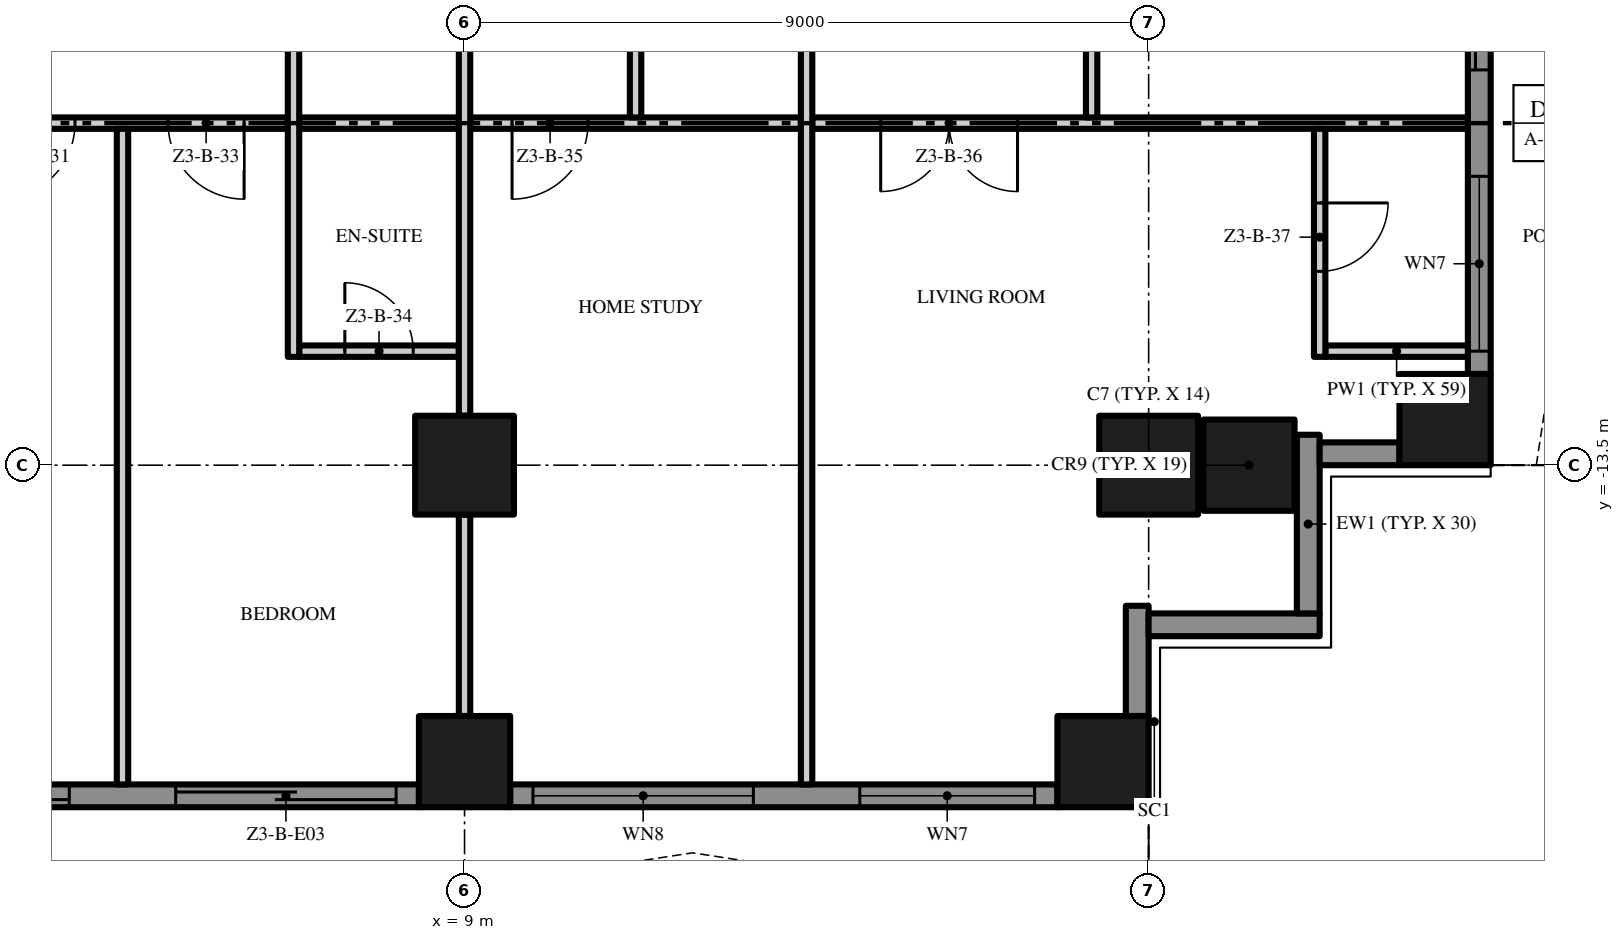
"""IFC4 building model, lengths in metres.
Left out: names, types, materials, properties, quantities, classifications, styles, units other than length and angle.
Written with IfcOpenShell. Run it as: python <this file> out.ifc"""

import sys

from ifc_helpers import new_model, si_unit, direction, frame, frame_2d, origin, origin_2d, place, context, subcontext, project, spatial, polyline, rectangle, outline, extrude, element, fill, save


model = new_model("IFC4")
c1 = context("Model", 3, precision=1e-05, world=origin(), true_north=direction((0.0, 1.0)))
c2 = subcontext(c1, "Body", "Model", "MODEL_VIEW")
j1 = project(units=[si_unit("LENGTHUNIT", "METRE"), si_unit("PLANEANGLEUNIT", "RADIAN")], contexts=[c1])
p1 = place(None, origin())
s1 = spatial("IfcSite", under=j1, at=p1, CompositionType="ELEMENT")
p2 = place(p1, origin())
s2 = spatial("IfcBuilding", under=s1, at=p2, CompositionType="ELEMENT")
p3 = place(p2, frame((0.0, 0.0, 136.4)))
s3 = spatial("IfcBuildingStorey", under=s2, at=p3, CompositionType="ELEMENT", Elevation=136.4)
p4 = place(p3, frame((18.0, -13.5, 0.0), z_axis=(0.0, 0.0, 1.0), x_axis=(1.0, 0.0, 0.0)))
e1 = element("IfcColumn", 1, at=p4, inside=s3, PredefinedType="COLUMN", context=c2, shape_type="SweptSolid", body=[
    extrude(rectangle(XDim=1.3, YDim=1.3, at=origin_2d()), origin(), (0.0, 0.0, 1.0), 3.5),
])
for number, where, z_axis, x_axis in (
    (2, (17.4, -17.4, 0.0), (0.0, 0.0, 1.0), (1.0, 0.0, 0.0)),
    (3, (21.9, -12.9, 0.0), (0.0, 0.0, 1.0), (1.0, 0.0, 0.0)),
    (4, (19.32, -13.5, 0.0), (0.0, 0.0, 1.0), (1.0, 0.0, 0.0)),
):
    element("IfcColumn", number, at=place(p3, frame(where, z_axis=z_axis, x_axis=x_axis)), inside=s3, PredefinedType="COLUMN", context=c2, shape_type="SweptSolid", body=[
        extrude(rectangle(XDim=1.2, YDim=1.2, at=origin_2d()), origin(), (0.0, 0.0, 1.0), 3.5),
    ])
p5 = place(p3, frame((9.0, -13.5, 0.0), z_axis=(0.0, 0.0, 1.0), x_axis=(1.0, 0.0, 0.0)))
e5 = element("IfcColumn", 5, at=p5, inside=s3, PredefinedType="COLUMN", context=c2, shape_type="SweptSolid", body=[
    extrude(rectangle(XDim=1.3, YDim=1.3, at=origin_2d()), origin(), (0.0, 0.0, 1.0), 3.5),
])
p6 = place(p3, frame((9.0, -17.4, 0.0), z_axis=(0.0, 0.0, 1.0), x_axis=(1.0, 0.0, 0.0)))
e6 = element("IfcColumn", 6, at=p6, inside=s3, PredefinedType="COLUMN", context=c2, shape_type="SweptSolid", body=[
    extrude(rectangle(XDim=1.2, YDim=1.2, at=origin_2d()), origin(), (0.0, 0.0, 1.0), 3.5),
])
p7 = place(p3, frame((8.4, -17.85, 0.0), z_axis=(0.0, 0.0, 1.0), x_axis=(-1.0, 0.0, 0.0)))
e7 = element("IfcWall", 7, at=p7, inside=s3, PredefinedType="SOLIDWALL", context=c2, shape_type="SweptSolid", body=[
    extrude(rectangle(XDim=7.8, YDim=0.3, at=frame_2d((3.9, 0.0))), origin(), (0.0, 0.0, 1.0), 3.5),
])
p8 = place(p7, frame((4.6, 0.0, 0.0)))
e8 = element("IfcOpeningElement", 8, at=p8, cuts=e7, PredefinedType="OPENING", context=c2, shape_type="SweptSolid", body=[
    extrude(rectangle(XDim=2.9, YDim=2.4, at=frame_2d((1.45, 1.2))), frame((0.0, 0.16, 0.0), z_axis=(0.0, -1.0, 0.0), x_axis=(1.0, 0.0, 0.0)), (0.0, 0.0, 1.0), 0.32),
])
p9 = place(p7, frame((0.3, 0.0, 0.0)))
e9 = element("IfcOpeningElement", 9, at=p9, cuts=e7, PredefinedType="OPENING", context=c2, shape_type="SweptSolid", body=[
    extrude(rectangle(XDim=2.9, YDim=2.4, at=frame_2d((1.45, 1.2))), frame((0.0, 0.16, 0.0), z_axis=(0.0, -1.0, 0.0), x_axis=(1.0, 0.0, 0.0)), (0.0, 0.0, 1.0), 0.32),
])
p10 = place(p3, frame((16.8, -17.85, 0.0), z_axis=(0.0, 0.0, 1.0), x_axis=(-1.0, 0.0, 0.0)))
e10 = element("IfcWall", 10, at=p10, inside=s3, PredefinedType="SOLIDWALL", context=c2, shape_type="SweptSolid", body=[
    extrude(rectangle(XDim=7.2, YDim=0.3, at=frame_2d((3.6, 0.0))), origin(), (0.0, 0.0, 1.0), 3.5),
])
p11 = place(p10, frame((4.0, 0.0, 0.45)))
e11 = element("IfcOpeningElement", 11, at=p11, cuts=e10, PredefinedType="OPENING", context=c2, shape_type="SweptSolid", body=[
    extrude(rectangle(XDim=2.9, YDim=2.65, at=frame_2d((1.45, 1.325))), frame((0.0, 0.16, 0.0), z_axis=(0.0, -1.0, 0.0), x_axis=(1.0, 0.0, 0.0)), (0.0, 0.0, 1.0), 0.32),
])
p12 = place(p10, frame((0.3, 0.0, 0.45)))
e12 = element("IfcOpeningElement", 12, at=p12, cuts=e10, PredefinedType="OPENING", context=c2, shape_type="SweptSolid", body=[
    extrude(rectangle(XDim=2.3, YDim=2.65, at=frame_2d((1.15, 1.325))), frame((0.0, 0.16, 0.0), z_axis=(0.0, -1.0, 0.0), x_axis=(1.0, 0.0, 0.0)), (0.0, 0.0, 1.0), 0.32),
])
p13 = place(p3, frame((17.85, -15.35, 0.0), z_axis=(0.0, 0.0, 1.0), x_axis=(0.0, -1.0, 0.0)))
e13 = element("IfcWall", 13, at=p13, inside=s3, PredefinedType="SOLIDWALL", context=c2, shape_type="SweptSolid", body=[
    extrude(rectangle(XDim=1.45, YDim=0.3, at=frame_2d((0.725, 0.0))), origin(), (0.0, 0.0, 1.0), 3.5),
])
p14 = place(p3, frame((20.25, -15.6, 0.0), z_axis=(0.0, 0.0, 1.0), x_axis=(-1.0, 0.0, 0.0)))
e14 = element("IfcWall", 14, at=p14, inside=s3, PredefinedType="SOLIDWALL", context=c2, shape_type="SweptSolid", body=[
    extrude(rectangle(XDim=2.25, YDim=0.3, at=frame_2d((1.125, 0.0))), origin(), (0.0, 0.0, 1.0), 3.5),
])
p15 = place(p3, frame((20.1, -13.1, 0.0), z_axis=(0.0, 0.0, 1.0), x_axis=(0.0, -1.0, 0.0)))
e15 = element("IfcWall", 15, at=p15, inside=s3, PredefinedType="SOLIDWALL", context=c2, shape_type="SweptSolid", body=[
    extrude(rectangle(XDim=2.35, YDim=0.3, at=frame_2d((1.175, 0.0))), origin(), (0.0, 0.0, 1.0), 3.5),
])
p16 = place(p3, frame((21.3, -13.35, 0.0), z_axis=(0.0, 0.0, 1.0), x_axis=(-1.0, 0.0, 0.0)))
e16 = element("IfcWall", 16, at=p16, inside=s3, PredefinedType="SOLIDWALL", context=c2, shape_type="SweptSolid", body=[
    extrude(rectangle(XDim=1.05, YDim=0.3, at=frame_2d((0.525, 0.0))), origin(), (0.0, 0.0, 1.0), 3.5),
])
p17 = place(p3, frame((22.35, -5.1, 0.0), z_axis=(0.0, 0.0, 1.0), x_axis=(0.0, -1.0, 0.0)))
e17 = element("IfcWall", 17, at=p17, inside=s3, PredefinedType="SOLIDWALL", context=c2, shape_type="SweptSolid", body=[
    extrude(rectangle(XDim=7.2, YDim=0.3, at=frame_2d((3.6, 0.0))), origin(), (0.0, 0.0, 1.0), 3.5),
])
p18 = place(p17, frame((4.6, 0.0, 0.45)))
e18 = element("IfcOpeningElement", 18, at=p18, cuts=e17, PredefinedType="OPENING", context=c2, shape_type="SweptSolid", body=[
    extrude(rectangle(XDim=2.3, YDim=2.65, at=frame_2d((1.15, 1.325))), frame((0.0, 0.16, 0.0), z_axis=(0.0, -1.0, 0.0), x_axis=(1.0, 0.0, 0.0)), (0.0, 0.0, 1.0), 0.32),
])
p19 = place(p17, frame((0.3, 0.0, 0.0)))
e19 = element("IfcOpeningElement", 19, at=p19, cuts=e17, PredefinedType="OPENING", context=c2, shape_type="SweptSolid", body=[
    extrude(rectangle(XDim=2.9, YDim=2.4, at=frame_2d((1.45, 1.2))), frame((0.0, 0.16, 0.0), z_axis=(0.0, -1.0, 0.0), x_axis=(1.0, 0.0, 0.0)), (0.0, 0.0, 1.0), 0.32),
])
p20 = place(p3, origin())
e20 = element("IfcWall", 20, at=p20, inside=s3, PredefinedType="USERDEFINED", context=c2, shape_type="SweptSolid", body=[
    extrude(outline(polyline([(-18.0, -18.6), (-16.5, -18.829), (-15.0, -19.429), (-13.5, -20.171), (-12.0, -20.771), (-10.5, -21.0), (-9.0, -20.771), (-7.5, -20.171), (-6.0, -19.429), (-4.5, -18.829), (-3.0, -18.6), (-1.5, -18.829), (0.0, -19.429), (1.5, -20.171), (3.0, -20.771), (4.5, -21.0), (6.0, -20.771), (7.5, -20.171), (9.0, -19.429), (10.5, -18.829), (12.0, -18.6), (13.5, -18.829), (15.0, -19.429), (16.5, -20.171), (18.0, -20.771), (18.093, -20.539), (16.602, -19.942), (15.102, -19.201), (13.566, -18.586), (12.0, -18.347), (10.434, -18.586), (8.898, -19.201), (7.398, -19.942), (5.934, -20.528), (4.5, -20.747), (3.066, -20.528), (1.602, -19.942), (0.102, -19.201), (-1.434, -18.586), (-3.0, -18.347), (-4.566, -18.586), (-6.102, -19.201), (-7.602, -19.942), (-9.066, -20.528), (-10.5, -20.747), (-11.934, -20.528), (-13.398, -19.942), (-14.898, -19.201), (-16.434, -18.586), (-17.962, -18.353), (-18.0, -18.6)])), origin(), (0.0, 0.0, 1.0), 0.9),
])
p21 = place(p3, origin())
e21 = element("IfcWall", 21, at=p21, inside=s3, PredefinedType="USERDEFINED", context=c2, shape_type="SweptSolid", body=[
    extrude(outline(polyline([(23.1, -13.5), (23.329, -12.0), (23.929, -10.5), (24.671, -9.0), (25.271, -7.5), (25.5, -6.0), (25.271, -4.5), (24.671, -3.0), (23.929, -1.5), (23.329, 0.0), (23.1, 1.5), (23.329, 3.0), (23.929, 4.5), (24.671, 6.0), (25.271, 7.5), (25.5, 9.0), (25.271, 10.5), (24.671, 12.0), (23.929, 13.5), (23.329, 15.0), (23.1, 16.5), (23.329, 18.0), (23.082, 18.038), (22.847, 16.5), (23.086, 14.934), (23.701, 13.398), (24.442, 11.898), (25.028, 10.434), (25.247, 9.0), (25.028, 7.566), (24.442, 6.102), (23.701, 4.602), (23.086, 3.066), (22.847, 1.5), (23.086, -0.066), (23.701, -1.602), (24.442, -3.102), (25.028, -4.566), (25.247, -6.0), (25.028, -7.434), (24.442, -8.898), (23.701, -10.398), (23.086, -11.934), (22.853, -13.462), (23.1, -13.5)])), origin(), (0.0, 0.0, 1.0), 0.9),
])
p22 = place(p3, frame((6.825, -12.0, 0.0), z_axis=(0.0, 0.0, 1.0), x_axis=(1.0, 0.0, 0.0)))
e22 = element("IfcWall", 22, at=p22, inside=s3, PredefinedType="PARTITIONING", context=c2, shape_type="SweptSolid", body=[
    extrude(rectangle(XDim=2.1, YDim=0.15, at=frame_2d((1.05, 0.0))), origin(), (0.0, 0.0, 1.0), 3.5),
])
p23 = place(p22, frame((0.6, 0.0, 0.0)))
e23 = element("IfcOpeningElement", 23, at=p23, cuts=e22, PredefinedType="OPENING", context=c2, shape_type="SweptSolid", body=[
    extrude(rectangle(XDim=0.9, YDim=2.1, at=frame_2d((0.45, 1.05))), frame((0.0, 0.085, 0.0), z_axis=(0.0, -1.0, 0.0), x_axis=(1.0, 0.0, 0.0)), (0.0, 0.0, 1.0), 0.17),
])
p24 = place(p3, frame((20.325, -12.0, 0.0), z_axis=(0.0, 0.0, 1.0), x_axis=(1.0, 0.0, 0.0)))
e24 = element("IfcWall", 24, at=p24, inside=s3, PredefinedType="PARTITIONING", context=c2, shape_type="SweptSolid", body=[
    extrude(rectangle(XDim=1.875, YDim=0.15, at=frame_2d((0.938, 0.0))), origin(), (0.0, 0.0, 1.0), 3.5),
])
p25 = place(p3, frame((6.675, -9.0, 0.0), z_axis=(0.0, 0.0, 1.0), x_axis=(-1.0, 0.0, 0.0)))
e25 = element("IfcWall", 25, at=p25, inside=s3, PredefinedType="PARTITIONING", context=c2, shape_type="SweptSolid", body=[
    extrude(rectangle(XDim=4.35, YDim=0.15, at=frame_2d((2.175, 0.0))), origin(), (0.0, 0.0, 1.0), 3.5),
])
p26 = place(p25, frame((2.8, 0.0, 0.0)))
e26 = element("IfcOpeningElement", 26, at=p26, cuts=e25, PredefinedType="OPENING", context=c2, shape_type="SweptSolid", body=[
    extrude(rectangle(XDim=1.0, YDim=2.4, at=frame_2d((0.5, 1.2))), frame((0.0, 0.085, 0.0), z_axis=(0.0, -1.0, 0.0), x_axis=(1.0, 0.0, 0.0)), (0.0, 0.0, 1.0), 0.17),
])
p27 = place(p25, frame((0.575, 0.0, 0.0)))
e27 = element("IfcOpeningElement", 27, at=p27, cuts=e25, PredefinedType="OPENING", context=c2, shape_type="SweptSolid", body=[
    extrude(rectangle(XDim=1.0, YDim=2.4, at=frame_2d((0.5, 1.2))), frame((0.0, 0.085, 0.0), z_axis=(0.0, -1.0, 0.0), x_axis=(1.0, 0.0, 0.0)), (0.0, 0.0, 1.0), 0.17),
])
p28 = place(p3, frame((6.825, -9.0, 0.0), z_axis=(0.0, 0.0, 1.0), x_axis=(1.0, 0.0, 0.0)))
e28 = element("IfcWall", 28, at=p28, inside=s3, PredefinedType="PARTITIONING", context=c2, shape_type="SweptSolid", body=[
    extrude(rectangle(XDim=2.1, YDim=0.15, at=frame_2d((1.05, 0.0))), origin(), (0.0, 0.0, 1.0), 3.5),
])
p29 = place(p3, frame((13.425, -9.0, 0.0), z_axis=(0.0, 0.0, 1.0), x_axis=(-1.0, 0.0, 0.0)))
e29 = element("IfcWall", 29, at=p29, inside=s3, PredefinedType="PARTITIONING", context=c2, shape_type="SweptSolid", body=[
    extrude(rectangle(XDim=4.35, YDim=0.15, at=frame_2d((2.175, 0.0))), origin(), (0.0, 0.0, 1.0), 3.5),
])
p30 = place(p29, frame((2.8, 0.0, 0.0)))
e30 = element("IfcOpeningElement", 30, at=p30, cuts=e29, PredefinedType="OPENING", context=c2, shape_type="SweptSolid", body=[
    extrude(rectangle(XDim=1.0, YDim=2.4, at=frame_2d((0.5, 1.2))), frame((0.0, 0.085, 0.0), z_axis=(0.0, -1.0, 0.0), x_axis=(1.0, 0.0, 0.0)), (0.0, 0.0, 1.0), 0.17),
])
p31 = place(p3, frame((22.2, -9.0, 0.0), z_axis=(0.0, 0.0, 1.0), x_axis=(-1.0, 0.0, 0.0)))
e31 = element("IfcWall", 31, at=p31, inside=s3, PredefinedType="PARTITIONING", context=c2, shape_type="SweptSolid", body=[
    extrude(rectangle(XDim=8.625, YDim=0.15, at=frame_2d((4.312, 0.0))), origin(), (0.0, 0.0, 1.0), 3.5),
])
p32 = place(p31, frame((5.925, 0.0, 0.0)))
e32 = element("IfcOpeningElement", 32, at=p32, cuts=e31, PredefinedType="OPENING", context=c2, shape_type="SweptSolid", body=[
    extrude(rectangle(XDim=1.8, YDim=2.4, at=frame_2d((0.9, 1.2))), frame((0.0, 0.085, 0.0), z_axis=(0.0, -1.0, 0.0), x_axis=(1.0, 0.0, 0.0)), (0.0, 0.0, 1.0), 0.17),
])
p33 = place(p3, frame((4.5, -17.7, 0.0), z_axis=(0.0, 0.0, 1.0), x_axis=(0.0, 1.0, 0.0)))
e33 = element("IfcWall", 33, at=p33, inside=s3, PredefinedType="PARTITIONING", context=c2, shape_type="SweptSolid", body=[
    extrude(rectangle(XDim=8.625, YDim=0.15, at=frame_2d((4.312, 0.0))), origin(), (0.0, 0.0, 1.0), 3.5),
])
p34 = place(p3, frame((6.75, -12.075, 0.0), z_axis=(0.0, 0.0, 1.0), x_axis=(0.0, 1.0, 0.0)))
e34 = element("IfcWall", 34, at=p34, inside=s3, PredefinedType="PARTITIONING", context=c2, shape_type="SweptSolid", body=[
    extrude(rectangle(XDim=7.65, YDim=0.15, at=frame_2d((3.825, 0.0))), origin(), (0.0, 0.0, 1.0), 3.5),
])
p35 = place(p3, frame((9.0, -16.8, 0.0), z_axis=(0.0, 0.0, 1.0), x_axis=(0.0, 1.0, 0.0)))
e35 = element("IfcWall", 35, at=p35, inside=s3, PredefinedType="PARTITIONING", context=c2, shape_type="SweptSolid", body=[
    extrude(rectangle(XDim=2.65, YDim=0.15, at=frame_2d((1.325, 0.0))), origin(), (0.0, 0.0, 1.0), 3.5),
])
p36 = place(p3, frame((9.0, -12.85, 0.0), z_axis=(0.0, 0.0, 1.0), x_axis=(0.0, 1.0, 0.0)))
e36 = element("IfcWall", 36, at=p36, inside=s3, PredefinedType="PARTITIONING", context=c2, shape_type="SweptSolid", body=[
    extrude(rectangle(XDim=7.7, YDim=0.15, at=frame_2d((3.85, 0.0))), origin(), (0.0, 0.0, 1.0), 3.5),
])
p37 = place(p3, frame((11.25, -8.925, 0.0), z_axis=(0.0, 0.0, 1.0), x_axis=(0.0, 1.0, 0.0)))
e37 = element("IfcWall", 37, at=p37, inside=s3, PredefinedType="PARTITIONING", context=c2, shape_type="SweptSolid", body=[
    extrude(rectangle(XDim=4.5, YDim=0.15, at=frame_2d((2.25, 0.0))), origin(), (0.0, 0.0, 1.0), 3.5),
])
p38 = place(p3, frame((13.5, -17.7, 0.0), z_axis=(0.0, 0.0, 1.0), x_axis=(0.0, 1.0, 0.0)))
e38 = element("IfcWall", 38, at=p38, inside=s3, PredefinedType="PARTITIONING", context=c2, shape_type="SweptSolid", body=[
    extrude(rectangle(XDim=13.275, YDim=0.15, at=frame_2d((6.638, 0.0))), origin(), (0.0, 0.0, 1.0), 3.5),
])
p39 = place(p3, frame((17.25, -8.925, 0.0), z_axis=(0.0, 0.0, 1.0), x_axis=(0.0, 1.0, 0.0)))
e39 = element("IfcWall", 39, at=p39, inside=s3, PredefinedType="PARTITIONING", context=c2, shape_type="SweptSolid", body=[
    extrude(rectangle(XDim=4.5, YDim=0.15, at=frame_2d((2.25, 0.0))), origin(), (0.0, 0.0, 1.0), 3.5),
])
p40 = place(p3, frame((20.25, -9.075, 0.0), z_axis=(0.0, 0.0, 1.0), x_axis=(0.0, -1.0, 0.0)))
e40 = element("IfcWall", 40, at=p40, inside=s3, PredefinedType="PARTITIONING", context=c2, shape_type="SweptSolid", body=[
    extrude(rectangle(XDim=3.0, YDim=0.15, at=frame_2d((1.5, 0.0))), origin(), (0.0, 0.0, 1.0), 3.5),
])
p41 = place(p40, frame((0.975, 0.0, 0.0)))
e41 = element("IfcOpeningElement", 41, at=p41, cuts=e40, PredefinedType="OPENING", context=c2, shape_type="SweptSolid", body=[
    extrude(rectangle(XDim=0.9, YDim=2.1, at=frame_2d((0.45, 1.05))), frame((0.0, 0.085, 0.0), z_axis=(0.0, -1.0, 0.0), x_axis=(1.0, 0.0, 0.0)), (0.0, 0.0, 1.0), 0.17),
])
p42 = place(p8, origin())
e42 = element("IfcDoor", 42, at=p42, inside=s3, OperationType="SINGLE_SWING_LEFT", PredefinedType="DOOR", context=c2, shape_type="SweptSolid", body=[
    extrude(rectangle(XDim=2.9, YDim=2.4, at=frame_2d((1.45, 1.2))), frame((0.0, 0.025, 0.0), z_axis=(0.0, -1.0, 0.0), x_axis=(1.0, 0.0, 0.0)), (0.0, 0.0, 1.0), 0.05),
])
fill(e8, e42)
p43 = place(p9, origin())
e43 = element("IfcDoor", 43, at=p43, inside=s3, OperationType="SINGLE_SWING_LEFT", PredefinedType="DOOR", context=c2, shape_type="SweptSolid", body=[
    extrude(rectangle(XDim=2.9, YDim=2.4, at=frame_2d((1.45, 1.2))), frame((0.0, 0.025, 0.0), z_axis=(0.0, -1.0, 0.0), x_axis=(1.0, 0.0, 0.0)), (0.0, 0.0, 1.0), 0.05),
])
fill(e9, e43)
p44 = place(p11, origin())
e44 = element("IfcWindow", 44, at=p44, inside=s3, PartitioningType="SINGLE_PANEL", PredefinedType="WINDOW", context=c2, shape_type="SweptSolid", body=[
    extrude(rectangle(XDim=2.9, YDim=2.65, at=frame_2d((1.45, 1.325))), frame((0.0, 0.03, 0.0), z_axis=(0.0, -1.0, 0.0), x_axis=(1.0, 0.0, 0.0)), (0.0, 0.0, 1.0), 0.06),
])
fill(e11, e44)
p45 = place(p12, origin())
e45 = element("IfcWindow", 45, at=p45, inside=s3, PartitioningType="SINGLE_PANEL", PredefinedType="WINDOW", context=c2, shape_type="SweptSolid", body=[
    extrude(rectangle(XDim=2.3, YDim=2.65, at=frame_2d((1.15, 1.325))), frame((0.0, 0.03, 0.0), z_axis=(0.0, -1.0, 0.0), x_axis=(1.0, 0.0, 0.0)), (0.0, 0.0, 1.0), 0.06),
])
fill(e12, e45)
p46 = place(p18, origin())
e46 = element("IfcWindow", 46, at=p46, inside=s3, PartitioningType="SINGLE_PANEL", PredefinedType="WINDOW", context=c2, shape_type="SweptSolid", body=[
    extrude(rectangle(XDim=2.3, YDim=2.65, at=frame_2d((1.15, 1.325))), frame((0.0, 0.03, 0.0), z_axis=(0.0, -1.0, 0.0), x_axis=(1.0, 0.0, 0.0)), (0.0, 0.0, 1.0), 0.06),
])
fill(e18, e46)
p47 = place(p19, origin())
e47 = element("IfcDoor", 47, at=p47, inside=s3, OperationType="SINGLE_SWING_LEFT", PredefinedType="DOOR", context=c2, shape_type="SweptSolid", body=[
    extrude(rectangle(XDim=2.9, YDim=2.4, at=frame_2d((1.45, 1.2))), frame((0.0, 0.025, 0.0), z_axis=(0.0, -1.0, 0.0), x_axis=(1.0, 0.0, 0.0)), (0.0, 0.0, 1.0), 0.05),
])
fill(e19, e47)
p48 = place(p26, origin())
e48 = element("IfcDoor", 48, at=p48, inside=s3, OperationType="SINGLE_SWING_RIGHT", PredefinedType="DOOR", context=c2, shape_type="SweptSolid", body=[
    extrude(rectangle(XDim=1.0, YDim=2.4, at=frame_2d((0.5, 1.2))), frame((0.0, 0.025, 0.0), z_axis=(0.0, -1.0, 0.0), x_axis=(1.0, 0.0, 0.0)), (0.0, 0.0, 1.0), 0.05),
])
fill(e26, e48)
p49 = place(p27, origin())
e49 = element("IfcDoor", 49, at=p49, inside=s3, OperationType="SINGLE_SWING_LEFT", PredefinedType="DOOR", context=c2, shape_type="SweptSolid", body=[
    extrude(rectangle(XDim=1.0, YDim=2.4, at=frame_2d((0.5, 1.2))), frame((0.0, 0.025, 0.0), z_axis=(0.0, -1.0, 0.0), x_axis=(1.0, 0.0, 0.0)), (0.0, 0.0, 1.0), 0.05),
])
fill(e27, e49)
p50 = place(p23, origin())
e50 = element("IfcDoor", 50, at=p50, inside=s3, OperationType="SINGLE_SWING_LEFT", PredefinedType="DOOR", context=c2, shape_type="SweptSolid", body=[
    extrude(rectangle(XDim=0.9, YDim=2.1, at=frame_2d((0.45, 1.05))), frame((0.0, 0.025, 0.0), z_axis=(0.0, -1.0, 0.0), x_axis=(1.0, 0.0, 0.0)), (0.0, 0.0, 1.0), 0.05),
])
fill(e23, e50)
p51 = place(p30, origin())
e51 = element("IfcDoor", 51, at=p51, inside=s3, OperationType="SINGLE_SWING_RIGHT", PredefinedType="DOOR", context=c2, shape_type="SweptSolid", body=[
    extrude(rectangle(XDim=1.0, YDim=2.4, at=frame_2d((0.5, 1.2))), frame((0.0, 0.025, 0.0), z_axis=(0.0, -1.0, 0.0), x_axis=(1.0, 0.0, 0.0)), (0.0, 0.0, 1.0), 0.05),
])
fill(e30, e51)
p52 = place(p32, origin())
e52 = element("IfcDoor", 52, at=p52, inside=s3, OperationType="DOUBLE_DOOR_SINGLE_SWING", PredefinedType="DOOR", context=c2, shape_type="SweptSolid", body=[
    extrude(rectangle(XDim=1.8, YDim=2.4, at=frame_2d((0.9, 1.2))), frame((0.0, 0.025, 0.0), z_axis=(0.0, -1.0, 0.0), x_axis=(1.0, 0.0, 0.0)), (0.0, 0.0, 1.0), 0.05),
])
fill(e32, e52)
p53 = place(p41, origin())
e53 = element("IfcDoor", 53, at=p53, inside=s3, OperationType="SINGLE_SWING_LEFT", PredefinedType="DOOR", context=c2, shape_type="SweptSolid", body=[
    extrude(rectangle(XDim=0.9, YDim=2.1, at=frame_2d((0.45, 1.05))), frame((0.0, 0.025, 0.0), z_axis=(0.0, -1.0, 0.0), x_axis=(1.0, 0.0, 0.0)), (0.0, 0.0, 1.0), 0.05),
])
fill(e41, e53)
save(model, sys.argv[1])
